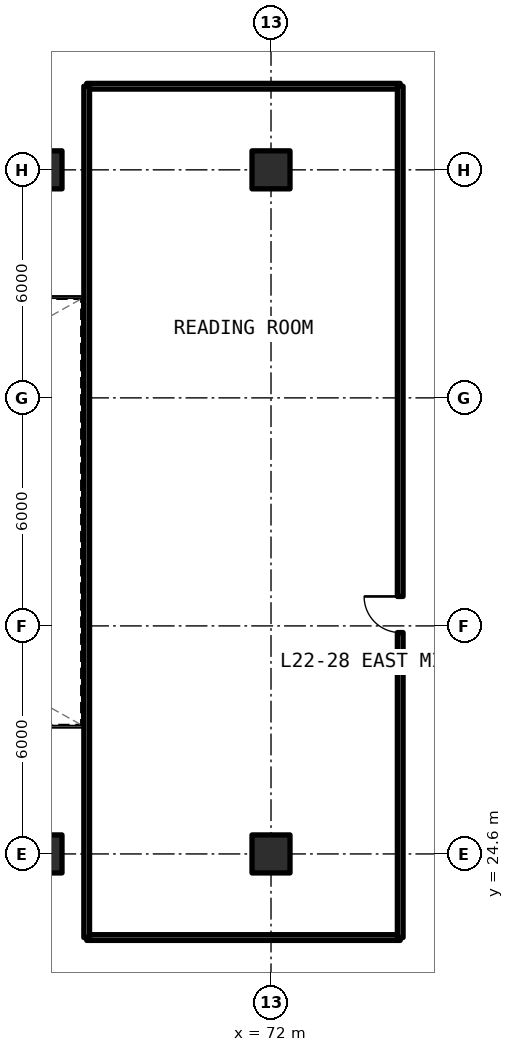
"""IFC4 building model, lengths in metres.
Left out: names, types, materials, properties, quantities, classifications, styles, units other than length and angle.
Written with IfcOpenShell. Run it as: python <this file> out.ifc"""

import sys

from ifc_helpers import new_model, si_unit, direction, frame, frame_2d, origin, origin_2d, place, context, subcontext, project, spatial, rectangle, extrude, element, fill, save


model = new_model("IFC4")
c1 = context("Model", 3, precision=1e-05, world=origin(), true_north=direction((0.0, 1.0)))
c2 = subcontext(c1, "Body", "Model", "MODEL_VIEW")
j1 = project(units=[si_unit("LENGTHUNIT", "METRE"), si_unit("PLANEANGLEUNIT", "RADIAN")], contexts=[c1])
p1 = place(None, origin())
s1 = spatial("IfcSite", under=j1, at=p1, CompositionType="ELEMENT")
p2 = place(p1, origin())
s2 = spatial("IfcBuilding", under=s1, at=p2, CompositionType="ELEMENT")
p3 = place(p2, frame((0.0, 0.0, 82.17)))
s3 = spatial("IfcBuildingStorey", under=s2, at=p3, CompositionType="ELEMENT", Elevation=82.17)
for number, where, z_axis, x_axis in (
    (1, (66.0, 24.6, 0.0), (0.0, 0.0, 1.0), (1.0, 0.0, 0.0)),
    (2, (66.0, 42.6, 0.0), (0.0, 0.0, 1.0), (1.0, 0.0, 0.0)),
    (3, (72.0, 24.6, 0.0), (0.0, 0.0, 1.0), (1.0, 0.0, 0.0)),
    (4, (72.0, 42.6, 0.0), (0.0, 0.0, 1.0), (1.0, 0.0, 0.0)),
):
    element("IfcColumn", number, at=place(p3, frame(where, z_axis=z_axis, x_axis=x_axis)), inside=s3, PredefinedType="COLUMN", context=c2, shape_type="SweptSolid", body=[
        extrude(rectangle(XDim=1.0, YDim=1.0, at=origin_2d()), origin(), (0.0, 0.0, 1.0), 3.3),
    ])
for number, where, z_axis, x_axis in (
    (5, (67.15, 22.4, 0.0), (0.0, 0.0, 1.0), (1.0, 0.0, 0.0)),
    (6, (67.15, 44.8, 0.0), (0.0, 0.0, 1.0), (1.0, 0.0, 0.0)),
):
    element("IfcWall", number, at=place(p3, frame(where, z_axis=z_axis, x_axis=x_axis)), inside=s3, PredefinedType="SOLIDWALL", context=c2, shape_type="SweptSolid", body=[
        extrude(rectangle(XDim=8.25, YDim=0.15, at=frame_2d((4.125, 0.0))), origin(), (0.0, 0.0, 1.0), 2.35),
    ])
p4 = place(p3, frame((67.15, 22.4, 0.0), z_axis=(0.0, 0.0, 1.0), x_axis=(0.0, 1.0, 0.0)))
e7 = element("IfcWall", 7, at=p4, inside=s3, PredefinedType="SOLIDWALL", context=c2, shape_type="SweptSolid", body=[
    extrude(rectangle(XDim=22.4, YDim=0.15, at=frame_2d((11.2, 0.0))), origin(), (0.0, 0.0, 1.0), 2.35),
])
p5 = place(p3, frame((75.4, 22.4, 0.0), z_axis=(0.0, 0.0, 1.0), x_axis=(0.0, 1.0, 0.0)))
e8 = element("IfcWall", 8, at=p5, inside=s3, PredefinedType="SOLIDWALL", context=c2, shape_type="SweptSolid", body=[
    extrude(rectangle(XDim=22.4, YDim=0.15, at=frame_2d((11.2, 0.0))), origin(), (0.0, 0.0, 1.0), 2.35),
])
p6 = place(p5, frame((8.025, 0.0, 0.0)))
e9 = element("IfcOpeningElement", 9, at=p6, cuts=e8, PredefinedType="OPENING", context=c2, shape_type="SweptSolid", body=[
    extrude(rectangle(XDim=0.95, YDim=2.15, at=frame_2d((0.475, 1.075))), frame((0.0, 0.085, 0.0), z_axis=(0.0, -1.0, 0.0), x_axis=(1.0, 0.0, 0.0)), (0.0, 0.0, 1.0), 0.17),
])
p7 = place(p6, origin())
e10 = element("IfcDoor", 10, at=p7, inside=s3, OperationType="SINGLE_SWING_RIGHT", PredefinedType="DOOR", context=c2, shape_type="SweptSolid", body=[
    extrude(rectangle(XDim=0.95, YDim=2.15, at=frame_2d((0.475, 1.075))), frame((0.0, 0.025, 0.0), z_axis=(0.0, -1.0, 0.0), x_axis=(1.0, 0.0, 0.0)), (0.0, 0.0, 1.0), 0.05),
])
fill(e9, e10)
save(model, sys.argv[1])
